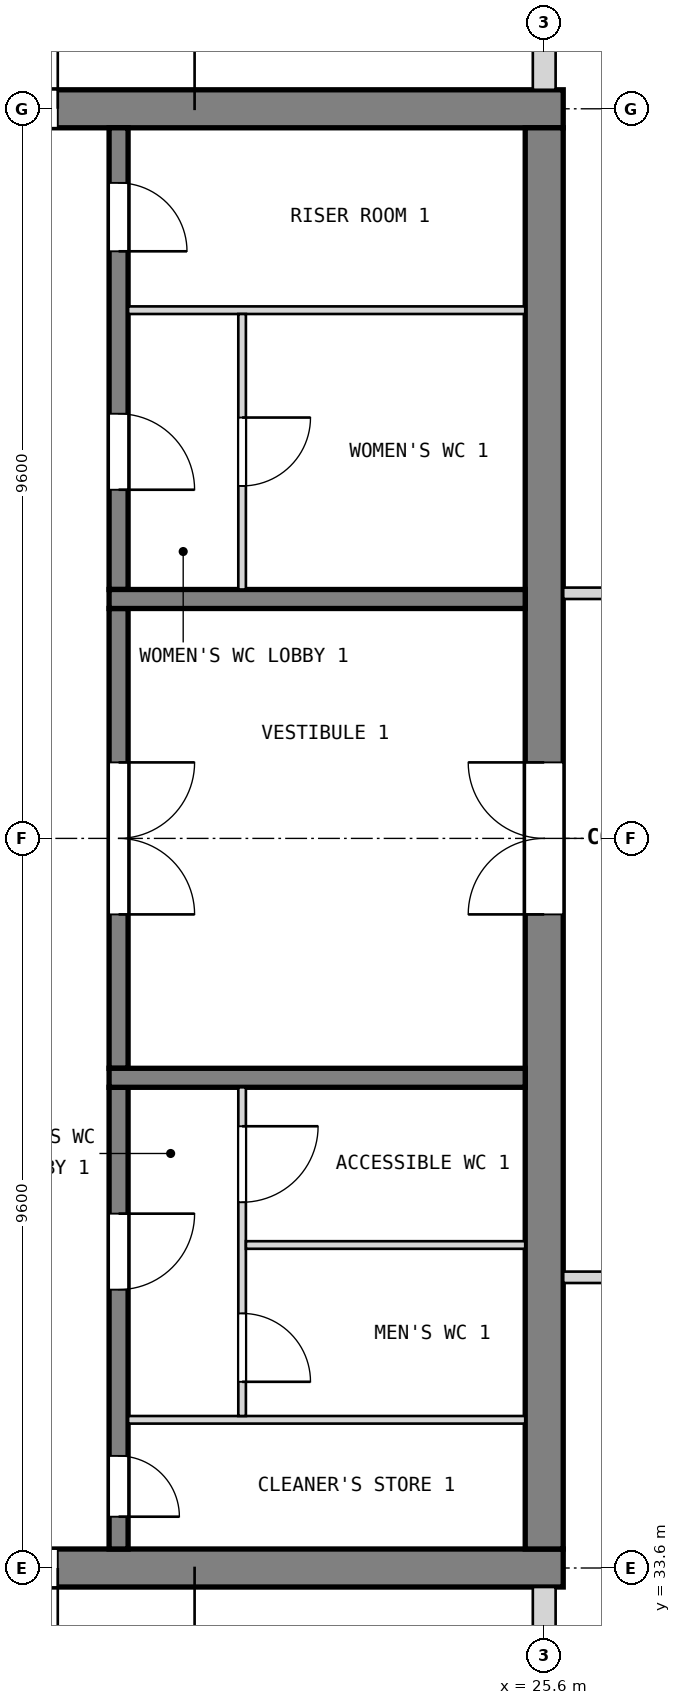
"""IFC4 building model, lengths in metres.
Left out: names, types, materials, properties, quantities, classifications, styles, units other than length and angle.
Written with IfcOpenShell. Run it as: python <this file> out.ifc"""

import sys

from ifc_helpers import new_model, si_unit, direction, frame, frame_2d, origin, place, context, subcontext, project, spatial, rectangle, extrude, element, fill, save


model = new_model("IFC4")
c1 = context("Model", 3, precision=1e-05, world=origin(), true_north=direction((0.0, 1.0)))
c2 = subcontext(c1, "Body", "Model", "MODEL_VIEW")
j1 = project(units=[si_unit("LENGTHUNIT", "METRE"), si_unit("PLANEANGLEUNIT", "RADIAN")], contexts=[c1])
p1 = place(None, origin())
s1 = spatial("IfcSite", under=j1, at=p1, CompositionType="ELEMENT")
p2 = place(p1, origin())
s2 = spatial("IfcBuilding", under=s1, at=p2, CompositionType="ELEMENT")
p3 = place(p2, frame((0.0, 0.0, 8.4)))
s3 = spatial("IfcBuildingStorey", under=s2, at=p3, CompositionType="ELEMENT", Elevation=8.4)
p4 = place(p3, frame((12.55, 52.8, 0.0), z_axis=(0.0, 0.0, 1.0), x_axis=(1.0, 0.0, 0.0)))
e1 = element("IfcWall", 1, at=p4, inside=s3, PredefinedType="SHEAR", context=c2, shape_type="SweptSolid", body=[
    extrude(rectangle(XDim=13.3, YDim=0.5, at=frame_2d((6.65, 0.0))), origin(), (0.0, 0.0, 1.0), 4.5),
])
p5 = place(p4, frame((1.85, 0.0, 1.0)))
e2 = element("IfcOpeningElement", 2, at=p5, cuts=e1, PredefinedType="OPENING", context=c2, shape_type="SweptSolid", body=[
    extrude(rectangle(XDim=0.4, YDim=2.0, at=frame_2d((0.2, 1.0))), frame((0.0, 0.26, 0.0), z_axis=(0.0, -1.0, 0.0), x_axis=(1.0, 0.0, 0.0)), (0.0, 0.0, 1.0), 0.52),
])
p6 = place(p4, frame((4.65, 0.0, 0.0)))
e3 = element("IfcOpeningElement", 3, at=p6, cuts=e1, PredefinedType="OPENING", context=c2, shape_type="SweptSolid", body=[
    extrude(rectangle(XDim=2.0, YDim=2.1, at=frame_2d((1.0, 1.05))), frame((0.0, 0.26, 0.0), z_axis=(0.0, -1.0, 0.0), x_axis=(1.0, 0.0, 0.0)), (0.0, 0.0, 1.0), 0.52),
])
p7 = place(p3, frame((12.55, 33.6, 0.0), z_axis=(0.0, 0.0, 1.0), x_axis=(1.0, 0.0, 0.0)))
e4 = element("IfcWall", 4, at=p7, inside=s3, PredefinedType="SHEAR", context=c2, shape_type="SweptSolid", body=[
    extrude(rectangle(XDim=13.3, YDim=0.5, at=frame_2d((6.65, 0.0))), origin(), (0.0, 0.0, 1.0), 4.5),
])
p8 = place(p7, frame((1.85, 0.0, 1.0)))
e5 = element("IfcOpeningElement", 5, at=p8, cuts=e4, PredefinedType="OPENING", context=c2, shape_type="SweptSolid", body=[
    extrude(rectangle(XDim=0.4, YDim=2.0, at=frame_2d((0.2, 1.0))), frame((0.0, 0.26, 0.0), z_axis=(0.0, -1.0, 0.0), x_axis=(1.0, 0.0, 0.0)), (0.0, 0.0, 1.0), 0.52),
])
p9 = place(p7, frame((4.65, 0.0, 0.0)))
e6 = element("IfcOpeningElement", 6, at=p9, cuts=e4, PredefinedType="OPENING", context=c2, shape_type="SweptSolid", body=[
    extrude(rectangle(XDim=2.0, YDim=2.1, at=frame_2d((1.0, 1.05))), frame((0.0, 0.26, 0.0), z_axis=(0.0, -1.0, 0.0), x_axis=(1.0, 0.0, 0.0)), (0.0, 0.0, 1.0), 0.52),
])
p10 = place(p3, frame((25.6, 33.85, 0.0), z_axis=(0.0, 0.0, 1.0), x_axis=(0.0, 1.0, 0.0)))
e7 = element("IfcWall", 7, at=p10, inside=s3, PredefinedType="SHEAR", context=c2, shape_type="SweptSolid", body=[
    extrude(rectangle(XDim=18.7, YDim=0.5, at=frame_2d((9.35, 0.0))), origin(), (0.0, 0.0, 1.0), 4.5),
])
p11 = place(p10, frame((8.35, 0.0, 0.0)))
e8 = element("IfcOpeningElement", 8, at=p11, cuts=e7, PredefinedType="OPENING", context=c2, shape_type="SweptSolid", body=[
    extrude(rectangle(XDim=2.0, YDim=2.1, at=frame_2d((1.0, 1.05))), frame((0.0, 0.26, 0.0), z_axis=(0.0, -1.0, 0.0), x_axis=(1.0, 0.0, 0.0)), (0.0, 0.0, 1.0), 0.52),
])
p12 = place(p3, frame((25.6, 31.0, 0.0), z_axis=(0.0, 0.0, 1.0), x_axis=(0.0, 1.0, 0.0)))
e9 = element("IfcWall", 9, at=p12, inside=s3, PredefinedType="SOLIDWALL", context=c2, shape_type="SweptSolid", body=[
    extrude(rectangle(XDim=2.35, YDim=0.3, at=frame_2d((1.175, 0.0))), origin(), (0.0, 0.0, 1.0), 3.48),
])
p13 = place(p3, frame((25.6, 53.05, 0.0), z_axis=(0.0, 0.0, 1.0), x_axis=(0.0, 1.0, 0.0)))
e10 = element("IfcWall", 10, at=p13, inside=s3, PredefinedType="SOLIDWALL", context=c2, shape_type="SweptSolid", body=[
    extrude(rectangle(XDim=2.35, YDim=0.3, at=frame_2d((1.175, 0.0))), origin(), (0.0, 0.0, 1.0), 3.48),
])
p14 = place(p3, frame((20.0, 33.85, 0.0), z_axis=(0.0, 0.0, 1.0), x_axis=(0.0, 1.0, 0.0)))
e11 = element("IfcWall", 11, at=p14, inside=s3, PredefinedType="SOLIDWALL", context=c2, shape_type="SweptSolid", body=[
    extrude(rectangle(XDim=6.075, YDim=0.25, at=frame_2d((3.038, 0.0))), origin(), (0.0, 0.0, 1.0), 4.2),
])
p15 = place(p14, frame((0.425, 0.0, 0.0)))
e12 = element("IfcOpeningElement", 12, at=p15, cuts=e11, PredefinedType="OPENING", context=c2, shape_type="SweptSolid", body=[
    extrude(rectangle(XDim=0.8, YDim=2.1, at=frame_2d((0.4, 1.05))), frame((0.0, 0.135, 0.0), z_axis=(0.0, -1.0, 0.0), x_axis=(1.0, 0.0, 0.0)), (0.0, 0.0, 1.0), 0.27),
])
p16 = place(p14, frame((3.413, 0.0, 0.0)))
e13 = element("IfcOpeningElement", 13, at=p16, cuts=e11, PredefinedType="OPENING", context=c2, shape_type="SweptSolid", body=[
    extrude(rectangle(XDim=1.0, YDim=2.1, at=frame_2d((0.5, 1.05))), frame((0.0, 0.135, 0.0), z_axis=(0.0, -1.0, 0.0), x_axis=(1.0, 0.0, 0.0)), (0.0, 0.0, 1.0), 0.27),
])
p17 = place(p3, frame((20.0, 40.175, 0.0), z_axis=(0.0, 0.0, 1.0), x_axis=(0.0, 1.0, 0.0)))
e14 = element("IfcWall", 14, at=p17, inside=s3, PredefinedType="SOLIDWALL", context=c2, shape_type="SweptSolid", body=[
    extrude(rectangle(XDim=6.05, YDim=0.25, at=frame_2d((3.025, 0.0))), origin(), (0.0, 0.0, 1.0), 4.2),
])
p18 = place(p17, frame((2.025, 0.0, 0.0)))
e15 = element("IfcOpeningElement", 15, at=p18, cuts=e14, PredefinedType="OPENING", context=c2, shape_type="SweptSolid", body=[
    extrude(rectangle(XDim=2.0, YDim=2.1, at=frame_2d((1.0, 1.05))), frame((0.0, 0.135, 0.0), z_axis=(0.0, -1.0, 0.0), x_axis=(1.0, 0.0, 0.0)), (0.0, 0.0, 1.0), 0.27),
])
p19 = place(p3, frame((20.0, 46.475, 0.0), z_axis=(0.0, 0.0, 1.0), x_axis=(0.0, 1.0, 0.0)))
e16 = element("IfcWall", 16, at=p19, inside=s3, PredefinedType="SOLIDWALL", context=c2, shape_type="SweptSolid", body=[
    extrude(rectangle(XDim=6.075, YDim=0.25, at=frame_2d((3.038, 0.0))), origin(), (0.0, 0.0, 1.0), 4.2),
])
p20 = place(p19, frame((1.312, 0.0, 0.0)))
e17 = element("IfcOpeningElement", 17, at=p20, cuts=e16, PredefinedType="OPENING", context=c2, shape_type="SweptSolid", body=[
    extrude(rectangle(XDim=1.0, YDim=2.1, at=frame_2d((0.5, 1.05))), frame((0.0, 0.135, 0.0), z_axis=(0.0, -1.0, 0.0), x_axis=(1.0, 0.0, 0.0)), (0.0, 0.0, 1.0), 0.27),
])
p21 = place(p19, frame((4.45, 0.0, 0.0)))
e18 = element("IfcOpeningElement", 18, at=p21, cuts=e16, PredefinedType="OPENING", context=c2, shape_type="SweptSolid", body=[
    extrude(rectangle(XDim=0.9, YDim=2.1, at=frame_2d((0.45, 1.05))), frame((0.0, 0.135, 0.0), z_axis=(0.0, -1.0, 0.0), x_axis=(1.0, 0.0, 0.0)), (0.0, 0.0, 1.0), 0.27),
])
for number, where, z_axis, x_axis in (
    (19, (19.875, 40.05, 0.0), (0.0, 0.0, 1.0), (1.0, 0.0, 0.0)),
    (20, (19.875, 46.35, 0.0), (0.0, 0.0, 1.0), (1.0, 0.0, 0.0)),
):
    element("IfcWall", number, at=place(p3, frame(where, z_axis=z_axis, x_axis=x_axis)), inside=s3, PredefinedType="SOLIDWALL", context=c2, shape_type="SweptSolid", body=[
        extrude(rectangle(XDim=5.475, YDim=0.25, at=frame_2d((2.738, 0.0))), origin(), (0.0, 0.0, 1.0), 4.2),
    ])
p22 = place(p3, frame((20.125, 35.55, 0.0), z_axis=(0.0, 0.0, 1.0), x_axis=(1.0, 0.0, 0.0)))
e21 = element("IfcWall", 21, at=p22, inside=s3, PredefinedType="PARTITIONING", context=c2, shape_type="SweptSolid", body=[
    extrude(rectangle(XDim=5.225, YDim=0.1, at=frame_2d((2.613, 0.0))), origin(), (0.0, 0.0, 1.0), 4.2),
])
p23 = place(p3, frame((21.625, 35.6, 0.0), z_axis=(0.0, 0.0, 1.0), x_axis=(0.0, 1.0, 0.0)))
e22 = element("IfcWall", 22, at=p23, inside=s3, PredefinedType="PARTITIONING", context=c2, shape_type="SweptSolid", body=[
    extrude(rectangle(XDim=4.325, YDim=0.1, at=frame_2d((2.163, 0.0))), origin(), (0.0, 0.0, 1.0), 4.2),
])
p24 = place(p23, frame((0.45, 0.0, 0.0)))
e23 = element("IfcOpeningElement", 23, at=p24, cuts=e22, PredefinedType="OPENING", context=c2, shape_type="SweptSolid", body=[
    extrude(rectangle(XDim=0.9, YDim=2.1, at=frame_2d((0.45, 1.05))), frame((0.0, 0.06, 0.0), z_axis=(0.0, -1.0, 0.0), x_axis=(1.0, 0.0, 0.0)), (0.0, 0.0, 1.0), 0.12),
])
p25 = place(p23, frame((2.812, 0.0, 0.0)))
e24 = element("IfcOpeningElement", 24, at=p25, cuts=e22, PredefinedType="OPENING", context=c2, shape_type="SweptSolid", body=[
    extrude(rectangle(XDim=1.0, YDim=2.1, at=frame_2d((0.5, 1.05))), frame((0.0, 0.06, 0.0), z_axis=(0.0, -1.0, 0.0), x_axis=(1.0, 0.0, 0.0)), (0.0, 0.0, 1.0), 0.12),
])
p26 = place(p3, frame((21.675, 37.85, 0.0), z_axis=(0.0, 0.0, 1.0), x_axis=(1.0, 0.0, 0.0)))
e25 = element("IfcWall", 25, at=p26, inside=s3, PredefinedType="PARTITIONING", context=c2, shape_type="SweptSolid", body=[
    extrude(rectangle(XDim=3.675, YDim=0.1, at=frame_2d((1.837, 0.0))), origin(), (0.0, 0.0, 1.0), 4.2),
])
p27 = place(p3, frame((20.125, 50.15, 0.0), z_axis=(0.0, 0.0, 1.0), x_axis=(1.0, 0.0, 0.0)))
e26 = element("IfcWall", 26, at=p27, inside=s3, PredefinedType="PARTITIONING", context=c2, shape_type="SweptSolid", body=[
    extrude(rectangle(XDim=5.225, YDim=0.1, at=frame_2d((2.613, 0.0))), origin(), (0.0, 0.0, 1.0), 4.2),
])
p28 = place(p3, frame((21.625, 46.475, 0.0), z_axis=(0.0, 0.0, 1.0), x_axis=(0.0, 1.0, 0.0)))
e27 = element("IfcWall", 27, at=p28, inside=s3, PredefinedType="PARTITIONING", context=c2, shape_type="SweptSolid", body=[
    extrude(rectangle(XDim=3.625, YDim=0.1, at=frame_2d((1.812, 0.0))), origin(), (0.0, 0.0, 1.0), 4.2),
])
p29 = place(p28, frame((1.363, 0.0, 0.0)))
e28 = element("IfcOpeningElement", 28, at=p29, cuts=e27, PredefinedType="OPENING", context=c2, shape_type="SweptSolid", body=[
    extrude(rectangle(XDim=0.9, YDim=2.1, at=frame_2d((0.45, 1.05))), frame((0.0, 0.06, 0.0), z_axis=(0.0, -1.0, 0.0), x_axis=(1.0, 0.0, 0.0)), (0.0, 0.0, 1.0), 0.12),
])
p30 = place(p3, frame((25.85, 37.425, 0.0), z_axis=(0.0, 0.0, 1.0), x_axis=(1.0, 0.0, 0.0)))
e29 = element("IfcWall", 29, at=p30, inside=s3, PredefinedType="PARTITIONING", context=c2, shape_type="SweptSolid", body=[
    extrude(rectangle(XDim=5.97, YDim=0.15, at=frame_2d((2.985, 0.0))), origin(), (0.0, 0.0, 1.0), 4.28),
])
p31 = place(p30, frame((2.45, 0.0, 0.0)))
e30 = element("IfcOpeningElement", 30, at=p31, cuts=e29, PredefinedType="OPENING", context=c2, shape_type="SweptSolid", body=[
    extrude(rectangle(XDim=1.0, YDim=2.1, at=frame_2d((0.5, 1.05))), frame((0.0, 0.085, 0.0), z_axis=(0.0, -1.0, 0.0), x_axis=(1.0, 0.0, 0.0)), (0.0, 0.0, 1.0), 0.17),
])
p32 = place(p3, frame((25.85, 46.425, 0.0), z_axis=(0.0, 0.0, 1.0), x_axis=(1.0, 0.0, 0.0)))
e31 = element("IfcWall", 31, at=p32, inside=s3, PredefinedType="PARTITIONING", context=c2, shape_type="SweptSolid", body=[
    extrude(rectangle(XDim=5.97, YDim=0.15, at=frame_2d((2.985, 0.0))), origin(), (0.0, 0.0, 1.0), 4.28),
])
p33 = place(p32, frame((2.45, 0.0, 0.0)))
e32 = element("IfcOpeningElement", 32, at=p33, cuts=e31, PredefinedType="OPENING", context=c2, shape_type="SweptSolid", body=[
    extrude(rectangle(XDim=1.0, YDim=2.1, at=frame_2d((0.5, 1.05))), frame((0.0, 0.085, 0.0), z_axis=(0.0, -1.0, 0.0), x_axis=(1.0, 0.0, 0.0)), (0.0, 0.0, 1.0), 0.17),
])
p34 = place(p18, frame((2.0, 0.0, 0.0), z_axis=(0.0, 0.0, 1.0), x_axis=(-1.0, 0.0, 0.0)))
e33 = element("IfcDoor", 33, at=p34, inside=s3, OperationType="DOUBLE_DOOR_SINGLE_SWING", PredefinedType="DOOR", context=c2, shape_type="SweptSolid", body=[
    extrude(rectangle(XDim=2.0, YDim=2.1, at=frame_2d((1.0, 1.05))), frame((0.0, 0.025, 0.0), z_axis=(0.0, -1.0, 0.0), x_axis=(1.0, 0.0, 0.0)), (0.0, 0.0, 1.0), 0.05),
])
fill(e15, e33)
p35 = place(p11, origin())
e34 = element("IfcDoor", 34, at=p35, inside=s3, OperationType="DOUBLE_DOOR_SINGLE_SWING", PredefinedType="DOOR", context=c2, shape_type="SweptSolid", body=[
    extrude(rectangle(XDim=2.0, YDim=2.1, at=frame_2d((1.0, 1.05))), frame((0.0, 0.025, 0.0), z_axis=(0.0, -1.0, 0.0), x_axis=(1.0, 0.0, 0.0)), (0.0, 0.0, 1.0), 0.05),
])
fill(e8, e34)
p36 = place(p15, frame((0.8, 0.0, 0.0), z_axis=(0.0, 0.0, 1.0), x_axis=(-1.0, 0.0, 0.0)))
e35 = element("IfcDoor", 35, at=p36, inside=s3, OperationType="SINGLE_SWING_RIGHT", PredefinedType="DOOR", context=c2, shape_type="SweptSolid", body=[
    extrude(rectangle(XDim=0.8, YDim=2.1, at=frame_2d((0.4, 1.05))), frame((0.0, 0.025, 0.0), z_axis=(0.0, -1.0, 0.0), x_axis=(1.0, 0.0, 0.0)), (0.0, 0.0, 1.0), 0.05),
])
fill(e12, e35)
p37 = place(p16, frame((1.0, 0.0, 0.0), z_axis=(0.0, 0.0, 1.0), x_axis=(-1.0, 0.0, 0.0)))
e36 = element("IfcDoor", 36, at=p37, inside=s3, OperationType="SINGLE_SWING_LEFT", PredefinedType="DOOR", context=c2, shape_type="SweptSolid", body=[
    extrude(rectangle(XDim=1.0, YDim=2.1, at=frame_2d((0.5, 1.05))), frame((0.0, 0.025, 0.0), z_axis=(0.0, -1.0, 0.0), x_axis=(1.0, 0.0, 0.0)), (0.0, 0.0, 1.0), 0.05),
])
fill(e13, e36)
p38 = place(p24, frame((0.9, 0.0, 0.0), z_axis=(0.0, 0.0, 1.0), x_axis=(-1.0, 0.0, 0.0)))
e37 = element("IfcDoor", 37, at=p38, inside=s3, OperationType="SINGLE_SWING_RIGHT", PredefinedType="DOOR", context=c2, shape_type="SweptSolid", body=[
    extrude(rectangle(XDim=0.9, YDim=2.1, at=frame_2d((0.45, 1.05))), frame((0.0, 0.025, 0.0), z_axis=(0.0, -1.0, 0.0), x_axis=(1.0, 0.0, 0.0)), (0.0, 0.0, 1.0), 0.05),
])
fill(e23, e37)
p39 = place(p25, frame((1.0, 0.0, 0.0), z_axis=(0.0, 0.0, 1.0), x_axis=(-1.0, 0.0, 0.0)))
e38 = element("IfcDoor", 38, at=p39, inside=s3, OperationType="SINGLE_SWING_LEFT", PredefinedType="DOOR", context=c2, shape_type="SweptSolid", body=[
    extrude(rectangle(XDim=1.0, YDim=2.1, at=frame_2d((0.5, 1.05))), frame((0.0, 0.025, 0.0), z_axis=(0.0, -1.0, 0.0), x_axis=(1.0, 0.0, 0.0)), (0.0, 0.0, 1.0), 0.05),
])
fill(e24, e38)
p40 = place(p20, frame((1.0, 0.0, 0.0), z_axis=(0.0, 0.0, 1.0), x_axis=(-1.0, 0.0, 0.0)))
e39 = element("IfcDoor", 39, at=p40, inside=s3, OperationType="SINGLE_SWING_RIGHT", PredefinedType="DOOR", context=c2, shape_type="SweptSolid", body=[
    extrude(rectangle(XDim=1.0, YDim=2.1, at=frame_2d((0.5, 1.05))), frame((0.0, 0.025, 0.0), z_axis=(0.0, -1.0, 0.0), x_axis=(1.0, 0.0, 0.0)), (0.0, 0.0, 1.0), 0.05),
])
fill(e17, e39)
p41 = place(p29, frame((0.9, 0.0, 0.0), z_axis=(0.0, 0.0, 1.0), x_axis=(-1.0, 0.0, 0.0)))
e40 = element("IfcDoor", 40, at=p41, inside=s3, OperationType="SINGLE_SWING_LEFT", PredefinedType="DOOR", context=c2, shape_type="SweptSolid", body=[
    extrude(rectangle(XDim=0.9, YDim=2.1, at=frame_2d((0.45, 1.05))), frame((0.0, 0.025, 0.0), z_axis=(0.0, -1.0, 0.0), x_axis=(1.0, 0.0, 0.0)), (0.0, 0.0, 1.0), 0.05),
])
fill(e28, e40)
p42 = place(p21, frame((0.9, 0.0, 0.0), z_axis=(0.0, 0.0, 1.0), x_axis=(-1.0, 0.0, 0.0)))
e41 = element("IfcDoor", 41, at=p42, inside=s3, OperationType="SINGLE_SWING_RIGHT", PredefinedType="DOOR", context=c2, shape_type="SweptSolid", body=[
    extrude(rectangle(XDim=0.9, YDim=2.1, at=frame_2d((0.45, 1.05))), frame((0.0, 0.025, 0.0), z_axis=(0.0, -1.0, 0.0), x_axis=(1.0, 0.0, 0.0)), (0.0, 0.0, 1.0), 0.05),
])
fill(e18, e41)
p43 = place(p9, frame((2.0, 0.0, 0.0), z_axis=(0.0, 0.0, 1.0), x_axis=(-1.0, 0.0, 0.0)))
e42 = element("IfcDoor", 42, at=p43, inside=s3, OperationType="DOUBLE_DOOR_SINGLE_SWING", PredefinedType="DOOR", context=c2, shape_type="SweptSolid", body=[
    extrude(rectangle(XDim=2.0, YDim=2.1, at=frame_2d((1.0, 1.05))), frame((0.0, 0.025, 0.0), z_axis=(0.0, -1.0, 0.0), x_axis=(1.0, 0.0, 0.0)), (0.0, 0.0, 1.0), 0.05),
])
fill(e6, e42)
p44 = place(p6, origin())
e43 = element("IfcDoor", 43, at=p44, inside=s3, OperationType="DOUBLE_DOOR_SINGLE_SWING", PredefinedType="DOOR", context=c2, shape_type="SweptSolid", body=[
    extrude(rectangle(XDim=2.0, YDim=2.1, at=frame_2d((1.0, 1.05))), frame((0.0, 0.025, 0.0), z_axis=(0.0, -1.0, 0.0), x_axis=(1.0, 0.0, 0.0)), (0.0, 0.0, 1.0), 0.05),
])
fill(e3, e43)
save(model, sys.argv[1])
